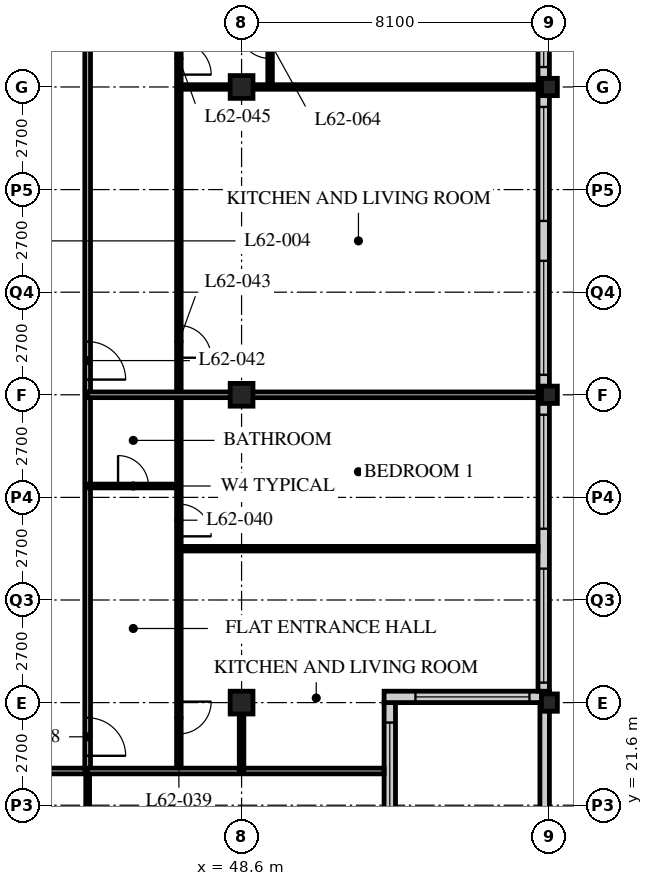
"""IFC4 building model, lengths in metres.
Left out: names, types, materials, properties, quantities, classifications, styles, units other than length and angle.
Written with IfcOpenShell. Run it as: python <this file> out.ifc"""

import sys

from ifc_helpers import new_model, si_unit, direction, frame, frame_2d, origin, origin_2d, place, context, subcontext, project, spatial, rectangle, hollow_rectangle, i_section, extrude, element, fill, save


model = new_model("IFC4")
c1 = context("Model", 3, precision=1e-05, world=origin(), true_north=direction((0.0, 1.0)))
c2 = subcontext(c1, "Body", "Model", "MODEL_VIEW")
j1 = project(units=[si_unit("LENGTHUNIT", "METRE"), si_unit("PLANEANGLEUNIT", "RADIAN")], contexts=[c1])
p1 = place(None, origin())
s1 = spatial("IfcSite", under=j1, at=p1, CompositionType="ELEMENT")
p2 = place(p1, origin())
s2 = spatial("IfcBuilding", under=s1, at=p2, CompositionType="ELEMENT")
p3 = place(p2, frame((0.0, 0.0, 242.4)))
s3 = spatial("IfcBuildingStorey", under=s2, at=p3, CompositionType="ELEMENT", Elevation=242.4)
for number, where, z_axis, x_axis in (
    (1, (48.6, 24.3, 0.0), (0.0, 0.0, 1.0), (1.0, 0.0, 0.0)),
    (2, (48.6, 32.4, 0.0), (0.0, 0.0, 1.0), (1.0, 0.0, 0.0)),
    (3, (48.6, 40.5, 0.0), (0.0, 0.0, 1.0), (1.0, 0.0, 0.0)),
):
    element("IfcColumn", number, at=place(p3, frame(where, z_axis=z_axis, x_axis=x_axis)), inside=s3, PredefinedType="COLUMN", context=c2, shape_type="SweptSolid", body=[
        extrude(hollow_rectangle(XDim=0.6, YDim=0.6, WallThickness=0.05, at=origin_2d()), origin(), (0.0, 0.0, 1.0), 3.9),
    ])
for number, where, z_axis, x_axis in (
    (4, (56.7, 24.3, 0.0), (0.0, 0.0, 1.0), (1.0, 0.0, 0.0)),
    (5, (56.7, 32.4, 0.0), (0.0, 0.0, 1.0), (1.0, 0.0, 0.0)),
    (6, (56.7, 40.5, 0.0), (0.0, 0.0, 1.0), (1.0, 0.0, 0.0)),
):
    element("IfcColumn", number, at=place(p3, frame(where, z_axis=z_axis, x_axis=x_axis)), inside=s3, PredefinedType="COLUMN", context=c2, shape_type="SweptSolid", body=[
        extrude(i_section(OverallWidth=0.418, OverallDepth=0.456, WebThickness=0.042, FlangeThickness=0.067, FilletRadius=0.015, at=origin_2d()), origin(), (0.0, 0.0, 1.0), 3.9),
    ])
p4 = place(p3, frame((52.5, 20.55, 0.0), z_axis=(0.0, 0.0, 1.0), x_axis=(0.0, 1.0, 0.0)))
e7 = element("IfcWall", 7, at=p4, inside=s3, PredefinedType="SOLIDWALL", context=c2, shape_type="SweptSolid", body=[
    extrude(rectangle(XDim=3.75, YDim=0.3, at=frame_2d((1.875, 0.0))), origin(), (0.0, 0.0, 1.0), 3.69),
])
p5 = place(p4, frame((0.225, 0.0, 0.6)))
e8 = element("IfcOpeningElement", 8, at=p5, cuts=e7, PredefinedType="OPENING", context=c2, shape_type="SweptSolid", body=[
    extrude(rectangle(XDim=3.0, YDim=2.3, at=frame_2d((1.5, 1.15))), frame((0.0, 0.16, 0.0), z_axis=(0.0, -1.0, 0.0), x_axis=(1.0, 0.0, 0.0)), (0.0, 0.0, 1.0), 0.32),
])
p6 = place(p3, frame((52.35, 24.45, 0.0), z_axis=(0.0, 0.0, 1.0), x_axis=(1.0, 0.0, 0.0)))
e9 = element("IfcWall", 9, at=p6, inside=s3, PredefinedType="SOLIDWALL", context=c2, shape_type="SweptSolid", body=[
    extrude(rectangle(XDim=4.35, YDim=0.3, at=frame_2d((2.175, 0.0))), origin(), (0.0, 0.0, 1.0), 3.69),
])
p7 = place(p6, frame((0.825, 0.0, 0.6)))
e10 = element("IfcOpeningElement", 10, at=p7, cuts=e9, PredefinedType="OPENING", context=c2, shape_type="SweptSolid", body=[
    extrude(rectangle(XDim=3.0, YDim=2.3, at=frame_2d((1.5, 1.15))), frame((0.0, 0.16, 0.0), z_axis=(0.0, -1.0, 0.0), x_axis=(1.0, 0.0, 0.0)), (0.0, 0.0, 1.0), 0.32),
])
p8 = place(p3, frame((56.55, 24.6, 0.0), z_axis=(0.0, 0.0, 1.0), x_axis=(0.0, 1.0, 0.0)))
e11 = element("IfcWall", 11, at=p8, inside=s3, PredefinedType="SOLIDWALL", context=c2, shape_type="SweptSolid", body=[
    extrude(rectangle(XDim=32.1, YDim=0.3, at=frame_2d((16.05, 0.0))), origin(), (0.0, 0.0, 1.0), 3.69),
])
p9 = place(p8, frame((0.225, 0.0, 0.6)))
e12 = element("IfcOpeningElement", 12, at=p9, cuts=e11, PredefinedType="OPENING", context=c2, shape_type="SweptSolid", body=[
    extrude(rectangle(XDim=3.0, YDim=2.3, at=frame_2d((1.5, 1.15))), frame((0.0, 0.16, 0.0), z_axis=(0.0, -1.0, 0.0), x_axis=(1.0, 0.0, 0.0)), (0.0, 0.0, 1.0), 0.32),
])
p10 = place(p8, frame((4.275, 0.0, 0.6)))
e13 = element("IfcOpeningElement", 13, at=p10, cuts=e11, PredefinedType="OPENING", context=c2, shape_type="SweptSolid", body=[
    extrude(rectangle(XDim=3.0, YDim=2.3, at=frame_2d((1.5, 1.15))), frame((0.0, 0.16, 0.0), z_axis=(0.0, -1.0, 0.0), x_axis=(1.0, 0.0, 0.0)), (0.0, 0.0, 1.0), 0.32),
])
p11 = place(p8, frame((8.325, 0.0, 0.6)))
e14 = element("IfcOpeningElement", 14, at=p11, cuts=e11, PredefinedType="OPENING", context=c2, shape_type="SweptSolid", body=[
    extrude(rectangle(XDim=3.0, YDim=2.3, at=frame_2d((1.5, 1.15))), frame((0.0, 0.16, 0.0), z_axis=(0.0, -1.0, 0.0), x_axis=(1.0, 0.0, 0.0)), (0.0, 0.0, 1.0), 0.32),
])
p12 = place(p8, frame((12.375, 0.0, 0.6)))
e15 = element("IfcOpeningElement", 15, at=p12, cuts=e11, PredefinedType="OPENING", context=c2, shape_type="SweptSolid", body=[
    extrude(rectangle(XDim=3.0, YDim=2.3, at=frame_2d((1.5, 1.15))), frame((0.0, 0.16, 0.0), z_axis=(0.0, -1.0, 0.0), x_axis=(1.0, 0.0, 0.0)), (0.0, 0.0, 1.0), 0.32),
])
p13 = place(p8, frame((16.425, 0.0, 0.6)))
e16 = element("IfcOpeningElement", 16, at=p13, cuts=e11, PredefinedType="OPENING", context=c2, shape_type="SweptSolid", body=[
    extrude(rectangle(XDim=3.0, YDim=2.3, at=frame_2d((1.5, 1.15))), frame((0.0, 0.16, 0.0), z_axis=(0.0, -1.0, 0.0), x_axis=(1.0, 0.0, 0.0)), (0.0, 0.0, 1.0), 0.32),
])
p14 = place(p8, frame((20.475, 0.0, 0.6)))
e17 = element("IfcOpeningElement", 17, at=p14, cuts=e11, PredefinedType="OPENING", context=c2, shape_type="SweptSolid", body=[
    extrude(rectangle(XDim=3.0, YDim=2.3, at=frame_2d((1.5, 1.15))), frame((0.0, 0.16, 0.0), z_axis=(0.0, -1.0, 0.0), x_axis=(1.0, 0.0, 0.0)), (0.0, 0.0, 1.0), 0.32),
])
p15 = place(p8, frame((24.525, 0.0, 0.6)))
e18 = element("IfcOpeningElement", 18, at=p15, cuts=e11, PredefinedType="OPENING", context=c2, shape_type="SweptSolid", body=[
    extrude(rectangle(XDim=3.0, YDim=2.3, at=frame_2d((1.5, 1.15))), frame((0.0, 0.16, 0.0), z_axis=(0.0, -1.0, 0.0), x_axis=(1.0, 0.0, 0.0)), (0.0, 0.0, 1.0), 0.32),
])
p16 = place(p8, frame((28.575, 0.0, 0.6)))
e19 = element("IfcOpeningElement", 19, at=p16, cuts=e11, PredefinedType="OPENING", context=c2, shape_type="SweptSolid", body=[
    extrude(rectangle(XDim=3.0, YDim=2.3, at=frame_2d((1.5, 1.15))), frame((0.0, 0.16, 0.0), z_axis=(0.0, -1.0, 0.0), x_axis=(1.0, 0.0, 0.0)), (0.0, 0.0, 1.0), 0.32),
])
p17 = place(p3, frame((56.575, 19.15, 0.0), z_axis=(0.0, 0.0, 1.0), x_axis=(0.0, 1.0, 0.0)))
e20 = element("IfcWall", 20, at=p17, inside=s3, PredefinedType="PARAPET", context=c2, shape_type="SweptSolid", body=[
    extrude(rectangle(XDim=5.15, YDim=0.25, at=frame_2d((2.575, 0.0))), origin(), (0.0, 0.0, 1.0), 1.38),
])
p18 = place(p3, frame((12.15, 22.5, 0.0), z_axis=(0.0, 0.0, 1.0), x_axis=(1.0, 0.0, 0.0)))
e21 = element("IfcWall", 21, at=p18, inside=s3, PredefinedType="PARTITIONING", context=c2, shape_type="SweptSolid", body=[
    extrude(rectangle(XDim=32.4, YDim=0.15, at=frame_2d((16.2, 0.0))), origin(), (0.0, 0.0, 1.0), 3.69),
])
p19 = place(p18, frame((6.4, 0.0, 0.0)))
e22 = element("IfcOpeningElement", 22, at=p19, cuts=e21, PredefinedType="OPENING", context=c2, shape_type="SweptSolid", body=[
    extrude(rectangle(XDim=1.0, YDim=2.1, at=frame_2d((0.5, 1.05))), frame((0.0, 0.085, 0.0), z_axis=(0.0, -1.0, 0.0), x_axis=(1.0, 0.0, 0.0)), (0.0, 0.0, 1.0), 0.17),
])
p20 = place(p18, frame((10.45, 0.0, 0.0)))
e23 = element("IfcOpeningElement", 23, at=p20, cuts=e21, PredefinedType="OPENING", context=c2, shape_type="SweptSolid", body=[
    extrude(rectangle(XDim=1.0, YDim=2.1, at=frame_2d((0.5, 1.05))), frame((0.0, 0.085, 0.0), z_axis=(0.0, -1.0, 0.0), x_axis=(1.0, 0.0, 0.0)), (0.0, 0.0, 1.0), 0.17),
])
p21 = place(p18, frame((14.5, 0.0, 0.0)))
e24 = element("IfcOpeningElement", 24, at=p21, cuts=e21, PredefinedType="OPENING", context=c2, shape_type="SweptSolid", body=[
    extrude(rectangle(XDim=1.0, YDim=2.1, at=frame_2d((0.5, 1.05))), frame((0.0, 0.085, 0.0), z_axis=(0.0, -1.0, 0.0), x_axis=(1.0, 0.0, 0.0)), (0.0, 0.0, 1.0), 0.17),
])
p22 = place(p18, frame((17.725, 0.0, 0.0)))
e25 = element("IfcOpeningElement", 25, at=p22, cuts=e21, PredefinedType="OPENING", context=c2, shape_type="SweptSolid", body=[
    extrude(rectangle(XDim=1.0, YDim=2.1, at=frame_2d((0.5, 1.05))), frame((0.0, 0.085, 0.0), z_axis=(0.0, -1.0, 0.0), x_axis=(1.0, 0.0, 0.0)), (0.0, 0.0, 1.0), 0.17),
])
p23 = place(p18, frame((22.6, 0.0, 0.0)))
e26 = element("IfcOpeningElement", 26, at=p23, cuts=e21, PredefinedType="OPENING", context=c2, shape_type="SweptSolid", body=[
    extrude(rectangle(XDim=1.0, YDim=2.1, at=frame_2d((0.5, 1.05))), frame((0.0, 0.085, 0.0), z_axis=(0.0, -1.0, 0.0), x_axis=(1.0, 0.0, 0.0)), (0.0, 0.0, 1.0), 0.17),
])
p24 = place(p18, frame((26.65, 0.0, 0.0)))
e27 = element("IfcOpeningElement", 27, at=p24, cuts=e21, PredefinedType="OPENING", context=c2, shape_type="SweptSolid", body=[
    extrude(rectangle(XDim=1.0, YDim=2.1, at=frame_2d((0.5, 1.05))), frame((0.0, 0.085, 0.0), z_axis=(0.0, -1.0, 0.0), x_axis=(1.0, 0.0, 0.0)), (0.0, 0.0, 1.0), 0.17),
])
p25 = place(p18, frame((2.625, 0.0, 0.0)))
e28 = element("IfcOpeningElement", 28, at=p25, cuts=e21, PredefinedType="OPENING", context=c2, shape_type="SweptSolid", body=[
    extrude(rectangle(XDim=1.0, YDim=2.1, at=frame_2d((0.5, 1.05))), frame((0.0, 0.085, 0.0), z_axis=(0.0, -1.0, 0.0), x_axis=(1.0, 0.0, 0.0)), (0.0, 0.0, 1.0), 0.17),
])
p26 = place(p18, frame((28.775, 0.0, 0.0)))
e29 = element("IfcOpeningElement", 29, at=p26, cuts=e21, PredefinedType="OPENING", context=c2, shape_type="SweptSolid", body=[
    extrude(rectangle(XDim=1.0, YDim=2.1, at=frame_2d((0.5, 1.05))), frame((0.0, 0.085, 0.0), z_axis=(0.0, -1.0, 0.0), x_axis=(1.0, 0.0, 0.0)), (0.0, 0.0, 1.0), 0.17),
])
p27 = place(p3, frame((44.55, 22.5, 0.0), z_axis=(0.0, 0.0, 1.0), x_axis=(0.0, 1.0, 0.0)))
e30 = element("IfcWall", 30, at=p27, inside=s3, PredefinedType="PARTITIONING", context=c2, shape_type="SweptSolid", body=[
    extrude(rectangle(XDim=26.1, YDim=0.15, at=frame_2d((13.05, 0.0))), origin(), (0.0, 0.0, 1.0), 3.69),
])
p28 = place(p27, frame((0.4, 0.0, 0.0)))
e31 = element("IfcOpeningElement", 31, at=p28, cuts=e30, PredefinedType="OPENING", context=c2, shape_type="SweptSolid", body=[
    extrude(rectangle(XDim=1.0, YDim=2.1, at=frame_2d((0.5, 1.05))), frame((0.0, 0.085, 0.0), z_axis=(0.0, -1.0, 0.0), x_axis=(1.0, 0.0, 0.0)), (0.0, 0.0, 1.0), 0.17),
])
p29 = place(p27, frame((10.3, 0.0, 0.0)))
e32 = element("IfcOpeningElement", 32, at=p29, cuts=e30, PredefinedType="OPENING", context=c2, shape_type="SweptSolid", body=[
    extrude(rectangle(XDim=1.0, YDim=2.1, at=frame_2d((0.5, 1.05))), frame((0.0, 0.085, 0.0), z_axis=(0.0, -1.0, 0.0), x_axis=(1.0, 0.0, 0.0)), (0.0, 0.0, 1.0), 0.17),
])
p30 = place(p3, frame((46.95, 22.5, 0.0), z_axis=(0.0, 0.0, 1.0), x_axis=(0.0, 1.0, 0.0)))
e33 = element("IfcWall", 33, at=p30, inside=s3, PredefinedType="PARTITIONING", context=c2, shape_type="SweptSolid", body=[
    extrude(rectangle(XDim=26.1, YDim=0.12, at=frame_2d((13.05, 0.0))), origin(), (0.0, 0.0, 1.0), 3.69),
])
p31 = place(p30, frame((0.975, 0.0, 0.0)))
e34 = element("IfcOpeningElement", 34, at=p31, cuts=e33, PredefinedType="OPENING", context=c2, shape_type="SweptSolid", body=[
    extrude(rectangle(XDim=0.85, YDim=2.1, at=frame_2d((0.425, 1.05))), frame((0.0, 0.07, 0.0), z_axis=(0.0, -1.0, 0.0), x_axis=(1.0, 0.0, 0.0)), (0.0, 0.0, 1.0), 0.14),
])
p32 = place(p30, frame((6.175, 0.0, 0.0)))
e35 = element("IfcOpeningElement", 35, at=p32, cuts=e33, PredefinedType="OPENING", context=c2, shape_type="SweptSolid", body=[
    extrude(rectangle(XDim=0.85, YDim=2.1, at=frame_2d((0.425, 1.05))), frame((0.0, 0.07, 0.0), z_axis=(0.0, -1.0, 0.0), x_axis=(1.0, 0.0, 0.0)), (0.0, 0.0, 1.0), 0.14),
])
p33 = place(p30, frame((10.875, 0.0, 0.0)))
e36 = element("IfcOpeningElement", 36, at=p33, cuts=e33, PredefinedType="OPENING", context=c2, shape_type="SweptSolid", body=[
    extrude(rectangle(XDim=0.85, YDim=2.1, at=frame_2d((0.425, 1.05))), frame((0.0, 0.07, 0.0), z_axis=(0.0, -1.0, 0.0), x_axis=(1.0, 0.0, 0.0)), (0.0, 0.0, 1.0), 0.14),
])
p34 = place(p30, frame((18.325, 0.0, 0.0)))
e37 = element("IfcOpeningElement", 37, at=p34, cuts=e33, PredefinedType="OPENING", context=c2, shape_type="SweptSolid", body=[
    extrude(rectangle(XDim=0.85, YDim=2.1, at=frame_2d((0.425, 1.05))), frame((0.0, 0.07, 0.0), z_axis=(0.0, -1.0, 0.0), x_axis=(1.0, 0.0, 0.0)), (0.0, 0.0, 1.0), 0.14),
])
p35 = place(p30, frame((22.375, 0.0, 0.0)))
e38 = element("IfcOpeningElement", 38, at=p35, cuts=e33, PredefinedType="OPENING", context=c2, shape_type="SweptSolid", body=[
    extrude(rectangle(XDim=0.85, YDim=2.1, at=frame_2d((0.425, 1.05))), frame((0.0, 0.07, 0.0), z_axis=(0.0, -1.0, 0.0), x_axis=(1.0, 0.0, 0.0)), (0.0, 0.0, 1.0), 0.14),
])
p36 = place(p3, frame((44.55, 30.0, 0.0), z_axis=(0.0, 0.0, 1.0), x_axis=(1.0, 0.0, 0.0)))
e39 = element("IfcWall", 39, at=p36, inside=s3, PredefinedType="PARTITIONING", context=c2, shape_type="SweptSolid", body=[
    extrude(rectangle(XDim=2.4, YDim=0.1, at=frame_2d((1.2, 0.0))), origin(), (0.0, 0.0, 1.0), 3.69),
])
p37 = place(p36, frame((0.8, 0.0, 0.0)))
e40 = element("IfcOpeningElement", 40, at=p37, cuts=e39, PredefinedType="OPENING", context=c2, shape_type="SweptSolid", body=[
    extrude(rectangle(XDim=0.8, YDim=2.1, at=frame_2d((0.4, 1.05))), frame((0.0, 0.06, 0.0), z_axis=(0.0, -1.0, 0.0), x_axis=(1.0, 0.0, 0.0)), (0.0, 0.0, 1.0), 0.12),
])
p38 = place(p3, frame((46.95, 28.35, 0.0), z_axis=(0.0, 0.0, 1.0), x_axis=(1.0, 0.0, 0.0)))
e41 = element("IfcWall", 41, at=p38, inside=s3, PredefinedType="PARTITIONING", context=c2, shape_type="SweptSolid", body=[
    extrude(rectangle(XDim=9.45, YDim=0.12, at=frame_2d((4.725, 0.0))), origin(), (0.0, 0.0, 1.0), 3.69),
])
p39 = place(p3, frame((44.55, 32.4, 0.0), z_axis=(0.0, 0.0, 1.0), x_axis=(1.0, 0.0, 0.0)))
e42 = element("IfcWall", 42, at=p39, inside=s3, PredefinedType="PARTITIONING", context=c2, shape_type="SweptSolid", body=[
    extrude(rectangle(XDim=11.85, YDim=0.15, at=frame_2d((5.925, 0.0))), origin(), (0.0, 0.0, 1.0), 2.928),
])
p40 = place(p3, frame((46.95, 40.5, 0.0), z_axis=(0.0, 0.0, 1.0), x_axis=(1.0, 0.0, 0.0)))
e43 = element("IfcWall", 43, at=p40, inside=s3, PredefinedType="PARTITIONING", context=c2, shape_type="SweptSolid", body=[
    extrude(rectangle(XDim=9.45, YDim=0.12, at=frame_2d((4.725, 0.0))), origin(), (0.0, 0.0, 1.0), 2.928),
])
p41 = place(p3, frame((44.55, 22.5, 0.0), z_axis=(0.0, 0.0, 1.0), x_axis=(0.0, -1.0, 0.0)))
e44 = element("IfcWall", 44, at=p41, inside=s3, PredefinedType="PARTITIONING", context=c2, shape_type="SweptSolid", body=[
    extrude(rectangle(XDim=2.4, YDim=0.1, at=frame_2d((1.2, 0.0))), origin(), (0.0, 0.0, 1.0), 3.69),
])
p42 = place(p3, frame((44.55, 22.5, 0.0), z_axis=(0.0, 0.0, 1.0), x_axis=(1.0, 0.0, 0.0)))
e45 = element("IfcWall", 45, at=p42, inside=s3, PredefinedType="PARTITIONING", context=c2, shape_type="SweptSolid", body=[
    extrude(rectangle(XDim=7.8, YDim=0.15, at=frame_2d((3.9, 0.0))), origin(), (0.0, 0.0, 1.0), 3.69),
])
p43 = place(p3, frame((49.35, 42.26, 0.0), z_axis=(0.0, 0.0, 1.0), x_axis=(0.0, -1.0, 0.0)))
e46 = element("IfcWall", 46, at=p43, inside=s3, PredefinedType="PARTITIONING", context=c2, shape_type="SweptSolid", body=[
    extrude(rectangle(XDim=1.76, YDim=0.12, at=frame_2d((0.88, 0.0))), origin(), (0.0, 0.0, 1.0), 3.69),
])
p44 = place(p43, frame((0.16, 0.0, 0.0)))
e47 = element("IfcOpeningElement", 47, at=p44, cuts=e46, PredefinedType="OPENING", context=c2, shape_type="SweptSolid", body=[
    extrude(rectangle(XDim=0.85, YDim=2.1, at=frame_2d((0.425, 1.05))), frame((0.0, 0.07, 0.0), z_axis=(0.0, -1.0, 0.0), x_axis=(1.0, 0.0, 0.0)), (0.0, 0.0, 1.0), 0.14),
])
p45 = place(p3, frame((48.6, 22.5, 0.0), z_axis=(0.0, 0.0, 1.0), x_axis=(0.0, 1.0, 0.0)))
e48 = element("IfcWall", 48, at=p45, inside=s3, PredefinedType="PARTITIONING", context=c2, shape_type="SweptSolid", body=[
    extrude(rectangle(XDim=1.5, YDim=0.12, at=frame_2d((0.75, 0.0))), origin(), (0.0, 0.0, 1.0), 2.928),
])
p46 = place(p5, origin())
e49 = element("IfcWindow", 49, at=p46, inside=s3, PartitioningType="SINGLE_PANEL", PredefinedType="WINDOW", context=c2, shape_type="SweptSolid", body=[
    extrude(rectangle(XDim=3.0, YDim=2.3, at=frame_2d((1.5, 1.15))), frame((0.0, 0.03, 0.0), z_axis=(0.0, -1.0, 0.0), x_axis=(1.0, 0.0, 0.0)), (0.0, 0.0, 1.0), 0.06),
])
fill(e8, e49)
p47 = place(p7, origin())
e50 = element("IfcWindow", 50, at=p47, inside=s3, PartitioningType="SINGLE_PANEL", PredefinedType="WINDOW", context=c2, shape_type="SweptSolid", body=[
    extrude(rectangle(XDim=3.0, YDim=2.3, at=frame_2d((1.5, 1.15))), frame((0.0, 0.03, 0.0), z_axis=(0.0, -1.0, 0.0), x_axis=(1.0, 0.0, 0.0)), (0.0, 0.0, 1.0), 0.06),
])
fill(e10, e50)
p48 = place(p9, origin())
e51 = element("IfcWindow", 51, at=p48, inside=s3, PartitioningType="SINGLE_PANEL", PredefinedType="WINDOW", context=c2, shape_type="SweptSolid", body=[
    extrude(rectangle(XDim=3.0, YDim=2.3, at=frame_2d((1.5, 1.15))), frame((0.0, 0.03, 0.0), z_axis=(0.0, -1.0, 0.0), x_axis=(1.0, 0.0, 0.0)), (0.0, 0.0, 1.0), 0.06),
])
fill(e12, e51)
p49 = place(p10, origin())
e52 = element("IfcWindow", 52, at=p49, inside=s3, PartitioningType="SINGLE_PANEL", PredefinedType="WINDOW", context=c2, shape_type="SweptSolid", body=[
    extrude(rectangle(XDim=3.0, YDim=2.3, at=frame_2d((1.5, 1.15))), frame((0.0, 0.03, 0.0), z_axis=(0.0, -1.0, 0.0), x_axis=(1.0, 0.0, 0.0)), (0.0, 0.0, 1.0), 0.06),
])
fill(e13, e52)
p50 = place(p11, origin())
e53 = element("IfcWindow", 53, at=p50, inside=s3, PartitioningType="SINGLE_PANEL", PredefinedType="WINDOW", context=c2, shape_type="SweptSolid", body=[
    extrude(rectangle(XDim=3.0, YDim=2.3, at=frame_2d((1.5, 1.15))), frame((0.0, 0.03, 0.0), z_axis=(0.0, -1.0, 0.0), x_axis=(1.0, 0.0, 0.0)), (0.0, 0.0, 1.0), 0.06),
])
fill(e14, e53)
p51 = place(p12, origin())
e54 = element("IfcWindow", 54, at=p51, inside=s3, PartitioningType="SINGLE_PANEL", PredefinedType="WINDOW", context=c2, shape_type="SweptSolid", body=[
    extrude(rectangle(XDim=3.0, YDim=2.3, at=frame_2d((1.5, 1.15))), frame((0.0, 0.03, 0.0), z_axis=(0.0, -1.0, 0.0), x_axis=(1.0, 0.0, 0.0)), (0.0, 0.0, 1.0), 0.06),
])
fill(e15, e54)
p52 = place(p13, origin())
e55 = element("IfcWindow", 55, at=p52, inside=s3, PartitioningType="SINGLE_PANEL", PredefinedType="WINDOW", context=c2, shape_type="SweptSolid", body=[
    extrude(rectangle(XDim=3.0, YDim=2.3, at=frame_2d((1.5, 1.15))), frame((0.0, 0.03, 0.0), z_axis=(0.0, -1.0, 0.0), x_axis=(1.0, 0.0, 0.0)), (0.0, 0.0, 1.0), 0.06),
])
fill(e16, e55)
p53 = place(p37, origin())
e56 = element("IfcDoor", 56, at=p53, inside=s3, OperationType="SINGLE_SWING_LEFT", PredefinedType="DOOR", context=c2, shape_type="SweptSolid", body=[
    extrude(rectangle(XDim=0.8, YDim=2.1, at=frame_2d((0.4, 1.05))), frame((0.0, 0.025, 0.0), z_axis=(0.0, -1.0, 0.0), x_axis=(1.0, 0.0, 0.0)), (0.0, 0.0, 1.0), 0.05),
])
fill(e40, e56)
p54 = place(p28, origin())
e57 = element("IfcDoor", 57, at=p54, inside=s3, OperationType="SINGLE_SWING_RIGHT", PredefinedType="DOOR", context=c2, shape_type="SweptSolid", body=[
    extrude(rectangle(XDim=1.0, YDim=2.1, at=frame_2d((0.5, 1.05))), frame((0.0, 0.025, 0.0), z_axis=(0.0, -1.0, 0.0), x_axis=(1.0, 0.0, 0.0)), (0.0, 0.0, 1.0), 0.05),
])
fill(e31, e57)
p55 = place(p31, origin())
e58 = element("IfcDoor", 58, at=p55, inside=s3, OperationType="SINGLE_SWING_LEFT", PredefinedType="DOOR", context=c2, shape_type="SweptSolid", body=[
    extrude(rectangle(XDim=0.85, YDim=2.1, at=frame_2d((0.425, 1.05))), frame((0.0, 0.025, 0.0), z_axis=(0.0, -1.0, 0.0), x_axis=(1.0, 0.0, 0.0)), (0.0, 0.0, 1.0), 0.05),
])
fill(e34, e58)
p56 = place(p32, origin())
e59 = element("IfcDoor", 59, at=p56, inside=s3, OperationType="SINGLE_SWING_RIGHT", PredefinedType="DOOR", context=c2, shape_type="SweptSolid", body=[
    extrude(rectangle(XDim=0.85, YDim=2.1, at=frame_2d((0.425, 1.05))), frame((0.0, 0.025, 0.0), z_axis=(0.0, -1.0, 0.0), x_axis=(1.0, 0.0, 0.0)), (0.0, 0.0, 1.0), 0.05),
])
fill(e35, e59)
p57 = place(p29, origin())
e60 = element("IfcDoor", 60, at=p57, inside=s3, OperationType="SINGLE_SWING_RIGHT", PredefinedType="DOOR", context=c2, shape_type="SweptSolid", body=[
    extrude(rectangle(XDim=1.0, YDim=2.1, at=frame_2d((0.5, 1.05))), frame((0.0, 0.025, 0.0), z_axis=(0.0, -1.0, 0.0), x_axis=(1.0, 0.0, 0.0)), (0.0, 0.0, 1.0), 0.05),
])
fill(e32, e60)
p58 = place(p33, origin())
e61 = element("IfcDoor", 61, at=p58, inside=s3, OperationType="SINGLE_SWING_RIGHT", PredefinedType="DOOR", context=c2, shape_type="SweptSolid", body=[
    extrude(rectangle(XDim=0.85, YDim=2.1, at=frame_2d((0.425, 1.05))), frame((0.0, 0.025, 0.0), z_axis=(0.0, -1.0, 0.0), x_axis=(1.0, 0.0, 0.0)), (0.0, 0.0, 1.0), 0.05),
])
fill(e36, e61)
p59 = place(p34, origin())
e62 = element("IfcDoor", 62, at=p59, inside=s3, OperationType="SINGLE_SWING_RIGHT", PredefinedType="DOOR", context=c2, shape_type="SweptSolid", body=[
    extrude(rectangle(XDim=0.85, YDim=2.1, at=frame_2d((0.425, 1.05))), frame((0.0, 0.025, 0.0), z_axis=(0.0, -1.0, 0.0), x_axis=(1.0, 0.0, 0.0)), (0.0, 0.0, 1.0), 0.05),
])
fill(e37, e62)
p60 = place(p44, origin())
e63 = element("IfcDoor", 63, at=p60, inside=s3, OperationType="SINGLE_SWING_RIGHT", PredefinedType="DOOR", context=c2, shape_type="SweptSolid", body=[
    extrude(rectangle(XDim=0.85, YDim=2.1, at=frame_2d((0.425, 1.05))), frame((0.0, 0.025, 0.0), z_axis=(0.0, -1.0, 0.0), x_axis=(1.0, 0.0, 0.0)), (0.0, 0.0, 1.0), 0.05),
])
fill(e47, e63)
save(model, sys.argv[1])
